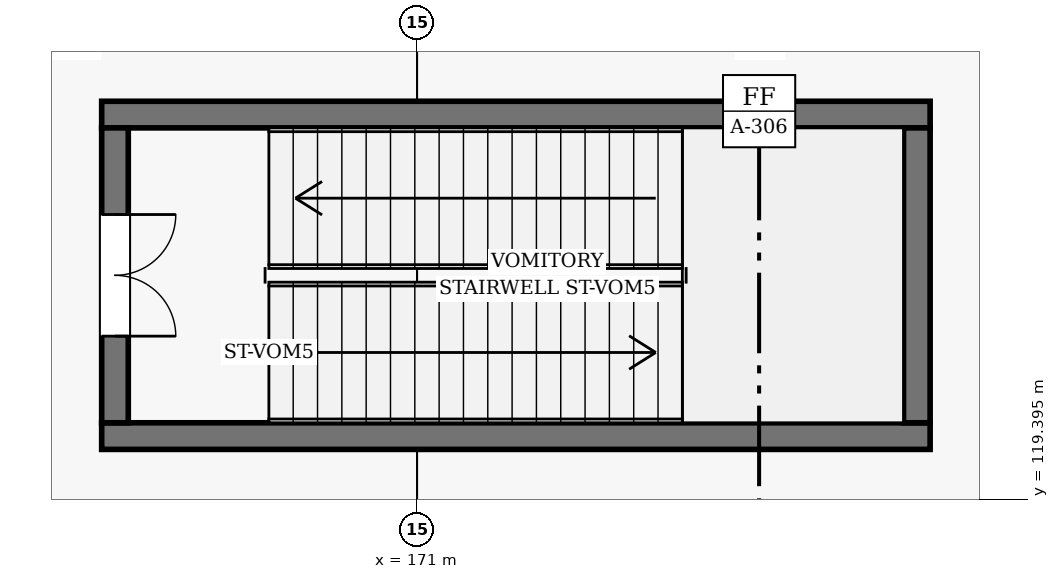
"""IFC4 building model, lengths in metres.
Left out: names, types, materials, properties, quantities, classifications, styles, units other than length and angle.
Written with IfcOpenShell. Run it as: python <this file> out.ifc"""

import sys

from ifc_helpers import new_model, si_unit, direction, frame, frame_2d, origin, place, context, subcontext, project, spatial, rectangle, extrude, element, fill, save


model = new_model("IFC4")
c1 = context("Model", 3, precision=1e-05, world=origin(), true_north=direction((0.0, 1.0)))
c2 = subcontext(c1, "Body", "Model", "MODEL_VIEW")
j1 = project(units=[si_unit("LENGTHUNIT", "METRE"), si_unit("PLANEANGLEUNIT", "RADIAN")], contexts=[c1])
p1 = place(None, origin())
s1 = spatial("IfcSite", under=j1, at=p1, CompositionType="ELEMENT")
p2 = place(p1, origin())
s2 = spatial("IfcBuilding", under=s1, at=p2, CompositionType="ELEMENT")
p3 = place(p2, origin())
s3 = spatial("IfcBuildingStorey", under=s2, at=p3, CompositionType="ELEMENT", Elevation=0.0)
for number, where, z_axis, x_axis in (
    (1, (166.85, 120.225, 0.0), (0.0, 0.0, 1.0), (1.0, 0.0, 0.0)),
    (2, (177.75, 124.455, 0.0), (0.0, 0.0, 1.0), (-1.0, 0.0, 0.0)),
):
    element("IfcWall", number, at=place(p3, frame(where, z_axis=z_axis, x_axis=x_axis)), inside=s3, PredefinedType="SHEAR", context=c2, shape_type="SweptSolid", body=[
        extrude(rectangle(XDim=10.9, YDim=0.35, at=frame_2d((5.45, 0.0))), origin(), (0.0, 0.0, 1.0), 5.16),
    ])
p4 = place(p3, frame((167.025, 124.28, 0.0), z_axis=(0.0, 0.0, 1.0), x_axis=(0.0, -1.0, 0.0)))
e3 = element("IfcWall", 3, at=p4, inside=s3, PredefinedType="SHEAR", context=c2, shape_type="SweptSolid", body=[
    extrude(rectangle(XDim=3.88, YDim=0.35, at=frame_2d((1.94, 0.0))), origin(), (0.0, 0.0, 1.0), 5.16),
])
p5 = place(p4, frame((1.14, 0.0, 0.0)))
e4 = element("IfcOpeningElement", 4, at=p5, cuts=e3, PredefinedType="OPENING", context=c2, shape_type="SweptSolid", body=[
    extrude(rectangle(XDim=1.6, YDim=2.2, at=frame_2d((0.8, 1.1))), frame((0.0, 0.185, 0.0), z_axis=(0.0, -1.0, 0.0), x_axis=(1.0, 0.0, 0.0)), (0.0, 0.0, 1.0), 0.37),
])
p6 = place(p3, frame((177.575, 120.4, 0.0), z_axis=(0.0, 0.0, 1.0), x_axis=(0.0, 1.0, 0.0)))
e5 = element("IfcWall", 5, at=p6, inside=s3, PredefinedType="SHEAR", context=c2, shape_type="SweptSolid", body=[
    extrude(rectangle(XDim=3.88, YDim=0.35, at=frame_2d((1.94, 0.0))), origin(), (0.0, 0.0, 1.0), 5.16),
])
p7 = place(p5, origin())
e6 = element("IfcDoor", 6, at=p7, inside=s3, OperationType="DOUBLE_DOOR_SINGLE_SWING", PredefinedType="DOOR", context=c2, shape_type="SweptSolid", body=[
    extrude(rectangle(XDim=1.6, YDim=2.2, at=frame_2d((0.8, 1.1))), frame((0.0, 0.025, 0.0), z_axis=(0.0, -1.0, 0.0), x_axis=(1.0, 0.0, 0.0)), (0.0, 0.0, 1.0), 0.05),
])
fill(e4, e6)
save(model, sys.argv[1])
